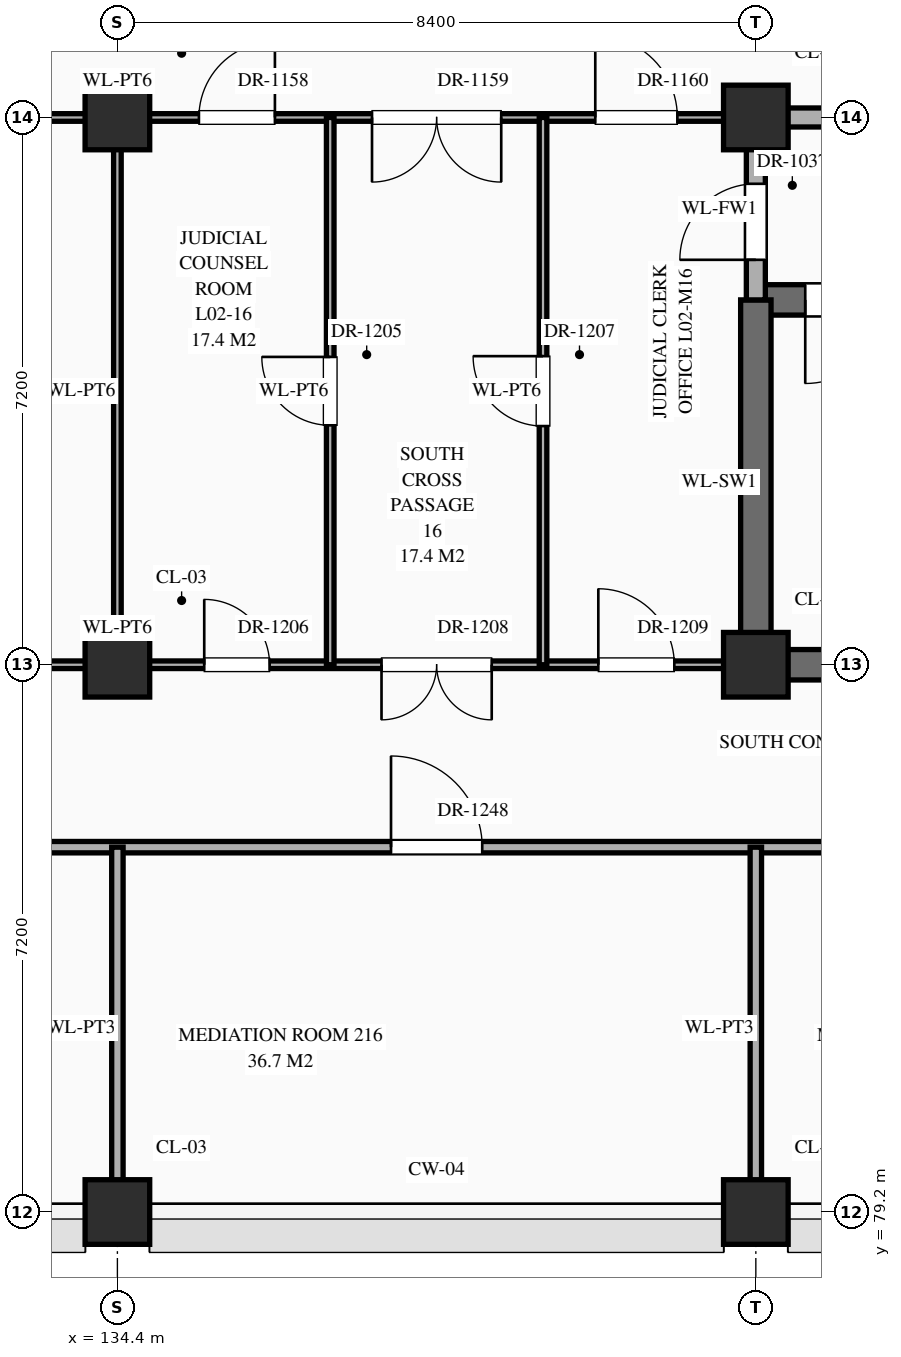
"""IFC4 building model, lengths in metres.
Left out: names, types, materials, properties, quantities, classifications, styles, units other than length and angle.
Written with IfcOpenShell. Run it as: python <this file> out.ifc"""

import sys

from ifc_helpers import new_model, si_unit, direction, frame, frame_2d, origin, origin_2d, place, context, subcontext, project, spatial, rectangle, extrude, element, fill, save


model = new_model("IFC4")
c1 = context("Model", 3, precision=1e-05, world=origin(), true_north=direction((0.0, 1.0)))
c2 = subcontext(c1, "Body", "Model", "MODEL_VIEW")
j1 = project(units=[si_unit("LENGTHUNIT", "METRE"), si_unit("PLANEANGLEUNIT", "RADIAN")], contexts=[c1])
p1 = place(None, origin())
s1 = spatial("IfcSite", under=j1, at=p1, CompositionType="ELEMENT")
p2 = place(p1, origin())
s2 = spatial("IfcBuilding", under=s1, at=p2, CompositionType="ELEMENT")
p3 = place(p2, frame((0.0, 0.0, 5.4)))
s3 = spatial("IfcBuildingStorey", under=s2, at=p3, CompositionType="ELEMENT", Elevation=5.4)
for number, where, z_axis, x_axis in (
    (1, (134.4, 79.2, 0.0), (0.0, 0.0, 1.0), (1.0, 0.0, 0.0)),
    (2, (134.4, 86.4, 0.0), (0.0, 0.0, 1.0), (1.0, 0.0, 0.0)),
    (3, (134.4, 93.6, 0.0), (0.0, 0.0, 1.0), (1.0, 0.0, 0.0)),
    (4, (142.8, 79.2, 0.0), (0.0, 0.0, 1.0), (1.0, 0.0, 0.0)),
    (5, (142.8, 86.4, 0.0), (0.0, 0.0, 1.0), (1.0, 0.0, 0.0)),
    (6, (142.8, 93.6, 0.0), (0.0, 0.0, 1.0), (1.0, 0.0, 0.0)),
):
    element("IfcColumn", number, at=place(p3, frame(where, z_axis=z_axis, x_axis=x_axis)), inside=s3, PredefinedType="COLUMN", context=c2, shape_type="SweptSolid", body=[
        extrude(rectangle(XDim=0.85, YDim=0.85, at=origin_2d()), origin(), (0.0, 0.0, 1.0), 5.4),
    ])
p4 = place(p3, frame((16.8, 84.0, 0.0), z_axis=(0.0, 0.0, 1.0), x_axis=(1.0, 0.0, 0.0)))
e7 = element("IfcWall", 7, at=p4, inside=s3, PredefinedType="STANDARD", context=c2, shape_type="SweptSolid", body=[
    extrude(rectangle(XDim=134.4, YDim=0.15, at=frame_2d((67.2, 0.0))), origin(), (0.0, 0.0, 1.0), 5.12),
])
p5 = place(p4, frame((3.58, 0.0, 0.0)))
e8 = element("IfcOpeningElement", 8, at=p5, cuts=e7, PredefinedType="OPENING", context=c2, shape_type="SweptSolid", body=[
    extrude(rectangle(XDim=1.24, YDim=2.3, at=frame_2d((0.62, 1.15))), frame((0.0, 0.087, 0.0), z_axis=(0.0, -1.0, 0.0), x_axis=(1.0, 0.0, 0.0)), (0.0, 0.0, 1.0), 0.174),
])
p6 = place(p4, frame((11.96, 0.0, 0.0)))
e9 = element("IfcOpeningElement", 9, at=p6, cuts=e7, PredefinedType="OPENING", context=c2, shape_type="SweptSolid", body=[
    extrude(rectangle(XDim=1.28, YDim=2.35, at=frame_2d((0.64, 1.175))), frame((0.0, 0.087, 0.0), z_axis=(0.0, -1.0, 0.0), x_axis=(1.0, 0.0, 0.0)), (0.0, 0.0, 1.0), 0.174),
])
p7 = place(p4, frame((20.53, 0.0, 0.0)))
e10 = element("IfcOpeningElement", 10, at=p7, cuts=e7, PredefinedType="OPENING", context=c2, shape_type="SweptSolid", body=[
    extrude(rectangle(XDim=0.94, YDim=2.3, at=frame_2d((0.47, 1.15))), frame((0.0, 0.087, 0.0), z_axis=(0.0, -1.0, 0.0), x_axis=(1.0, 0.0, 0.0)), (0.0, 0.0, 1.0), 0.174),
])
p8 = place(p4, frame((28.91, 0.0, 0.0)))
e11 = element("IfcOpeningElement", 11, at=p8, cuts=e7, PredefinedType="OPENING", context=c2, shape_type="SweptSolid", body=[
    extrude(rectangle(XDim=0.98, YDim=2.35, at=frame_2d((0.49, 1.175))), frame((0.0, 0.087, 0.0), z_axis=(0.0, -1.0, 0.0), x_axis=(1.0, 0.0, 0.0)), (0.0, 0.0, 1.0), 0.174),
])
p9 = place(p4, frame((37.27, 0.0, 0.0)))
e12 = element("IfcOpeningElement", 12, at=p9, cuts=e7, PredefinedType="OPENING", context=c2, shape_type="SweptSolid", body=[
    extrude(rectangle(XDim=1.06, YDim=2.4, at=frame_2d((0.53, 1.2))), frame((0.0, 0.087, 0.0), z_axis=(0.0, -1.0, 0.0), x_axis=(1.0, 0.0, 0.0)), (0.0, 0.0, 1.0), 0.174),
])
p10 = place(p4, frame((45.63, 0.0, 0.0)))
e13 = element("IfcOpeningElement", 13, at=p10, cuts=e7, PredefinedType="OPENING", context=c2, shape_type="SweptSolid", body=[
    extrude(rectangle(XDim=1.14, YDim=2.4, at=frame_2d((0.57, 1.2))), frame((0.0, 0.087, 0.0), z_axis=(0.0, -1.0, 0.0), x_axis=(1.0, 0.0, 0.0)), (0.0, 0.0, 1.0), 0.174),
])
p11 = place(p4, frame((54.15, 0.0, 0.0)))
e14 = element("IfcOpeningElement", 14, at=p11, cuts=e7, PredefinedType="OPENING", context=c2, shape_type="SweptSolid", body=[
    extrude(rectangle(XDim=0.9, YDim=2.15, at=frame_2d((0.45, 1.075))), frame((0.0, 0.087, 0.0), z_axis=(0.0, -1.0, 0.0), x_axis=(1.0, 0.0, 0.0)), (0.0, 0.0, 1.0), 0.174),
])
p12 = place(p4, frame((62.57, 0.0, 0.0)))
e15 = element("IfcOpeningElement", 15, at=p12, cuts=e7, PredefinedType="OPENING", context=c2, shape_type="SweptSolid", body=[
    extrude(rectangle(XDim=0.86, YDim=2.1, at=frame_2d((0.43, 1.05))), frame((0.0, 0.087, 0.0), z_axis=(0.0, -1.0, 0.0), x_axis=(1.0, 0.0, 0.0)), (0.0, 0.0, 1.0), 0.174),
])
p13 = place(p4, frame((70.92, 0.0, 0.0)))
e16 = element("IfcOpeningElement", 16, at=p13, cuts=e7, PredefinedType="OPENING", context=c2, shape_type="SweptSolid", body=[
    extrude(rectangle(XDim=0.96, YDim=2.2, at=frame_2d((0.48, 1.1))), frame((0.0, 0.087, 0.0), z_axis=(0.0, -1.0, 0.0), x_axis=(1.0, 0.0, 0.0)), (0.0, 0.0, 1.0), 0.174),
])
p14 = place(p4, frame((79.3, 0.0, 0.0)))
e17 = element("IfcOpeningElement", 17, at=p14, cuts=e7, PredefinedType="OPENING", context=c2, shape_type="SweptSolid", body=[
    extrude(rectangle(XDim=1.0, YDim=2.25, at=frame_2d((0.5, 1.125))), frame((0.0, 0.087, 0.0), z_axis=(0.0, -1.0, 0.0), x_axis=(1.0, 0.0, 0.0)), (0.0, 0.0, 1.0), 0.174),
])
p15 = place(p4, frame((87.68, 0.0, 0.0)))
e18 = element("IfcOpeningElement", 18, at=p15, cuts=e7, PredefinedType="OPENING", context=c2, shape_type="SweptSolid", body=[
    extrude(rectangle(XDim=1.04, YDim=2.2, at=frame_2d((0.52, 1.1))), frame((0.0, 0.087, 0.0), z_axis=(0.0, -1.0, 0.0), x_axis=(1.0, 0.0, 0.0)), (0.0, 0.0, 1.0), 0.174),
])
p16 = place(p4, frame((96.06, 0.0, 0.0)))
e19 = element("IfcOpeningElement", 19, at=p16, cuts=e7, PredefinedType="OPENING", context=c2, shape_type="SweptSolid", body=[
    extrude(rectangle(XDim=1.08, YDim=2.25, at=frame_2d((0.54, 1.125))), frame((0.0, 0.087, 0.0), z_axis=(0.0, -1.0, 0.0), x_axis=(1.0, 0.0, 0.0)), (0.0, 0.0, 1.0), 0.174),
])
p17 = place(p4, frame((104.44, 0.0, 0.0)))
e20 = element("IfcOpeningElement", 20, at=p17, cuts=e7, PredefinedType="OPENING", context=c2, shape_type="SweptSolid", body=[
    extrude(rectangle(XDim=1.12, YDim=2.25, at=frame_2d((0.56, 1.125))), frame((0.0, 0.087, 0.0), z_axis=(0.0, -1.0, 0.0), x_axis=(1.0, 0.0, 0.0)), (0.0, 0.0, 1.0), 0.174),
])
p18 = place(p4, frame((112.82, 0.0, 0.0)))
e21 = element("IfcOpeningElement", 21, at=p18, cuts=e7, PredefinedType="OPENING", context=c2, shape_type="SweptSolid", body=[
    extrude(rectangle(XDim=1.16, YDim=2.3, at=frame_2d((0.58, 1.15))), frame((0.0, 0.087, 0.0), z_axis=(0.0, -1.0, 0.0), x_axis=(1.0, 0.0, 0.0)), (0.0, 0.0, 1.0), 0.174),
])
p19 = place(p4, frame((121.2, 0.0, 0.0)))
e22 = element("IfcOpeningElement", 22, at=p19, cuts=e7, PredefinedType="OPENING", context=c2, shape_type="SweptSolid", body=[
    extrude(rectangle(XDim=1.2, YDim=2.35, at=frame_2d((0.6, 1.175))), frame((0.0, 0.087, 0.0), z_axis=(0.0, -1.0, 0.0), x_axis=(1.0, 0.0, 0.0)), (0.0, 0.0, 1.0), 0.174),
])
p20 = place(p4, frame((129.58, 0.0, 0.0)))
e23 = element("IfcOpeningElement", 23, at=p20, cuts=e7, PredefinedType="OPENING", context=c2, shape_type="SweptSolid", body=[
    extrude(rectangle(XDim=1.24, YDim=2.3, at=frame_2d((0.62, 1.15))), frame((0.0, 0.087, 0.0), z_axis=(0.0, -1.0, 0.0), x_axis=(1.0, 0.0, 0.0)), (0.0, 0.0, 1.0), 0.174),
])
p21 = place(p3, frame((126.0, 86.4, 0.0), z_axis=(0.0, 0.0, 1.0), x_axis=(1.0, 0.0, 0.0)))
e24 = element("IfcWall", 24, at=p21, inside=s3, PredefinedType="STANDARD", context=c2, shape_type="SweptSolid", body=[
    extrude(rectangle(XDim=16.8, YDim=0.1, at=frame_2d((8.4, 0.0))), origin(), (0.0, 0.0, 1.0), 4.27),
])
p22 = place(p21, frame((3.63, 0.0, 0.0)))
e25 = element("IfcOpeningElement", 25, at=p22, cuts=e24, PredefinedType="OPENING", context=c2, shape_type="SweptSolid", body=[
    extrude(rectangle(XDim=1.14, YDim=2.4, at=frame_2d((0.57, 1.2))), frame((0.0, 0.062, 0.0), z_axis=(0.0, -1.0, 0.0), x_axis=(1.0, 0.0, 0.0)), (0.0, 0.0, 1.0), 0.124),
])
p23 = place(p21, frame((9.542, 0.0, 0.0)))
e26 = element("IfcOpeningElement", 26, at=p23, cuts=e24, PredefinedType="OPENING", context=c2, shape_type="SweptSolid", body=[
    extrude(rectangle(XDim=0.86, YDim=2.1, at=frame_2d((0.43, 1.05))), frame((0.0, 0.062, 0.0), z_axis=(0.0, -1.0, 0.0), x_axis=(1.0, 0.0, 0.0)), (0.0, 0.0, 1.0), 0.124),
])
p24 = place(p21, frame((11.875, 0.0, 0.0)))
e27 = element("IfcOpeningElement", 27, at=p24, cuts=e24, PredefinedType="OPENING", context=c2, shape_type="SweptSolid", body=[
    extrude(rectangle(XDim=1.45, YDim=2.3, at=frame_2d((0.725, 1.15))), frame((0.0, 0.062, 0.0), z_axis=(0.0, -1.0, 0.0), x_axis=(1.0, 0.0, 0.0)), (0.0, 0.0, 1.0), 0.124),
])
p25 = place(p21, frame((14.728, 0.0, 0.0)))
e28 = element("IfcOpeningElement", 28, at=p25, cuts=e24, PredefinedType="OPENING", context=c2, shape_type="SweptSolid", body=[
    extrude(rectangle(XDim=1.0, YDim=2.25, at=frame_2d((0.5, 1.125))), frame((0.0, 0.062, 0.0), z_axis=(0.0, -1.0, 0.0), x_axis=(1.0, 0.0, 0.0)), (0.0, 0.0, 1.0), 0.124),
])
p26 = place(p3, frame((142.8, 86.4, 0.0), z_axis=(0.0, 0.0, 1.0), x_axis=(1.0, 0.0, 0.0)))
e29 = element("IfcWall", 29, at=p26, inside=s3, PredefinedType="SHEAR", context=c2, shape_type="SweptSolid", body=[
    extrude(rectangle(XDim=8.4, YDim=0.4, at=frame_2d((4.2, 0.0))), origin(), (0.0, 0.0, 1.0), 5.12),
])
p27 = place(p3, frame((142.8, 91.2, 0.0), z_axis=(0.0, 0.0, 1.0), x_axis=(1.0, 0.0, 0.0)))
e30 = element("IfcWall", 30, at=p27, inside=s3, PredefinedType="SHEAR", context=c2, shape_type="SweptSolid", body=[
    extrude(rectangle(XDim=8.4, YDim=0.4, at=frame_2d((4.2, 0.0))), origin(), (0.0, 0.0, 1.0), 5.12),
])
p28 = place(p27, frame((0.65, 0.0, 0.0)))
e31 = element("IfcOpeningElement", 31, at=p28, cuts=e30, PredefinedType="OPENING", context=c2, shape_type="SweptSolid", body=[
    extrude(rectangle(XDim=1.1, YDim=2.2, at=frame_2d((0.55, 1.1))), frame((0.0, 0.212, 0.0), z_axis=(0.0, -1.0, 0.0), x_axis=(1.0, 0.0, 0.0)), (0.0, 0.0, 1.0), 0.424),
])
p29 = place(p3, frame((126.0, 93.6, 0.0), z_axis=(0.0, 0.0, 1.0), x_axis=(1.0, 0.0, 0.0)))
e32 = element("IfcWall", 32, at=p29, inside=s3, PredefinedType="STANDARD", context=c2, shape_type="SweptSolid", body=[
    extrude(rectangle(XDim=16.8, YDim=0.1, at=frame_2d((8.4, 0.0))), origin(), (0.0, 0.0, 1.0), 4.27),
])
p30 = place(p29, frame((3.72, 0.0, 0.0)))
e33 = element("IfcOpeningElement", 33, at=p30, cuts=e32, PredefinedType="OPENING", context=c2, shape_type="SweptSolid", body=[
    extrude(rectangle(XDim=0.96, YDim=2.2, at=frame_2d((0.48, 1.1))), frame((0.0, 0.062, 0.0), z_axis=(0.0, -1.0, 0.0), x_axis=(1.0, 0.0, 0.0)), (0.0, 0.0, 1.0), 0.124),
])
p31 = place(p29, frame((9.472, 0.0, 0.0)))
e34 = element("IfcOpeningElement", 34, at=p31, cuts=e32, PredefinedType="OPENING", context=c2, shape_type="SweptSolid", body=[
    extrude(rectangle(XDim=1.0, YDim=2.25, at=frame_2d((0.5, 1.125))), frame((0.0, 0.062, 0.0), z_axis=(0.0, -1.0, 0.0), x_axis=(1.0, 0.0, 0.0)), (0.0, 0.0, 1.0), 0.124),
])
p32 = place(p29, frame((11.75, 0.0, 0.0)))
e35 = element("IfcOpeningElement", 35, at=p32, cuts=e32, PredefinedType="OPENING", context=c2, shape_type="SweptSolid", body=[
    extrude(rectangle(XDim=1.7, YDim=2.45, at=frame_2d((0.85, 1.225))), frame((0.0, 0.062, 0.0), z_axis=(0.0, -1.0, 0.0), x_axis=(1.0, 0.0, 0.0)), (0.0, 0.0, 1.0), 0.124),
])
p33 = place(p29, frame((14.688, 0.0, 0.0)))
e36 = element("IfcOpeningElement", 36, at=p33, cuts=e32, PredefinedType="OPENING", context=c2, shape_type="SweptSolid", body=[
    extrude(rectangle(XDim=1.08, YDim=2.25, at=frame_2d((0.54, 1.125))), frame((0.0, 0.062, 0.0), z_axis=(0.0, -1.0, 0.0), x_axis=(1.0, 0.0, 0.0)), (0.0, 0.0, 1.0), 0.124),
])
p34 = place(p3, frame((142.8, 93.6, 0.0), z_axis=(0.0, 0.0, 1.0), x_axis=(1.0, 0.0, 0.0)))
e37 = element("IfcWall", 37, at=p34, inside=s3, PredefinedType="STANDARD", context=c2, shape_type="SweptSolid", body=[
    extrude(rectangle(XDim=8.4, YDim=0.25, at=frame_2d((4.2, 0.0))), origin(), (0.0, 0.0, 1.0), 4.27),
])
p35 = place(p34, frame((3.45, 0.0, 0.0)))
e38 = element("IfcOpeningElement", 38, at=p35, cuts=e37, PredefinedType="OPENING", context=c2, shape_type="SweptSolid", body=[
    extrude(rectangle(XDim=1.5, YDim=2.25, at=frame_2d((0.75, 1.125))), frame((0.0, 0.137, 0.0), z_axis=(0.0, -1.0, 0.0), x_axis=(1.0, 0.0, 0.0)), (0.0, 0.0, 1.0), 0.274),
])
p36 = place(p3, frame((134.4, 79.24, 0.0), z_axis=(0.0, 0.0, 1.0), x_axis=(0.0, 1.0, 0.0)))
e39 = element("IfcWall", 39, at=p36, inside=s3, PredefinedType="STANDARD", context=c2, shape_type="SweptSolid", body=[
    extrude(rectangle(XDim=4.76, YDim=0.15, at=frame_2d((2.38, 0.0))), origin(), (0.0, 0.0, 1.0), 4.37),
])
p37 = place(p3, frame((134.4, 86.4, 0.0), z_axis=(0.0, 0.0, 1.0), x_axis=(0.0, 1.0, 0.0)))
e40 = element("IfcWall", 40, at=p37, inside=s3, PredefinedType="STANDARD", context=c2, shape_type="SweptSolid", body=[
    extrude(rectangle(XDim=7.2, YDim=0.1, at=frame_2d((3.6, 0.0))), origin(), (0.0, 0.0, 1.0), 4.37),
])
p38 = place(p3, frame((137.2, 86.4, 0.0), z_axis=(0.0, 0.0, 1.0), x_axis=(0.0, 1.0, 0.0)))
e41 = element("IfcWall", 41, at=p38, inside=s3, PredefinedType="STANDARD", context=c2, shape_type="SweptSolid", body=[
    extrude(rectangle(XDim=7.2, YDim=0.1, at=frame_2d((3.6, 0.0))), origin(), (0.0, 0.0, 1.0), 5.12),
])
p39 = place(p38, frame((3.15, 0.0, 0.0)))
e42 = element("IfcOpeningElement", 42, at=p39, cuts=e41, PredefinedType="OPENING", context=c2, shape_type="SweptSolid", body=[
    extrude(rectangle(XDim=0.9, YDim=2.15, at=frame_2d((0.45, 1.075))), frame((0.0, 0.062, 0.0), z_axis=(0.0, -1.0, 0.0), x_axis=(1.0, 0.0, 0.0)), (0.0, 0.0, 1.0), 0.124),
])
p40 = place(p3, frame((140.0, 86.4, 0.0), z_axis=(0.0, 0.0, 1.0), x_axis=(0.0, 1.0, 0.0)))
e43 = element("IfcWall", 43, at=p40, inside=s3, PredefinedType="STANDARD", context=c2, shape_type="SweptSolid", body=[
    extrude(rectangle(XDim=7.2, YDim=0.1, at=frame_2d((3.6, 0.0))), origin(), (0.0, 0.0, 1.0), 5.12),
])
p41 = place(p40, frame((3.14, 0.0, 0.0)))
e44 = element("IfcOpeningElement", 44, at=p41, cuts=e43, PredefinedType="OPENING", context=c2, shape_type="SweptSolid", body=[
    extrude(rectangle(XDim=0.92, YDim=2.15, at=frame_2d((0.46, 1.075))), frame((0.0, 0.062, 0.0), z_axis=(0.0, -1.0, 0.0), x_axis=(1.0, 0.0, 0.0)), (0.0, 0.0, 1.0), 0.124),
])
p42 = place(p3, frame((142.8, 79.24, 0.0), z_axis=(0.0, 0.0, 1.0), x_axis=(0.0, 1.0, 0.0)))
e45 = element("IfcWall", 45, at=p42, inside=s3, PredefinedType="STANDARD", context=c2, shape_type="SweptSolid", body=[
    extrude(rectangle(XDim=4.76, YDim=0.15, at=frame_2d((2.38, 0.0))), origin(), (0.0, 0.0, 1.0), 4.37),
])
p43 = place(p3, frame((142.8, 86.4, 0.0), z_axis=(0.0, 0.0, 1.0), x_axis=(0.0, 1.0, 0.0)))
e46 = element("IfcWall", 46, at=p43, inside=s3, PredefinedType="SHEAR", context=c2, shape_type="SweptSolid", body=[
    extrude(rectangle(XDim=4.8, YDim=0.4, at=frame_2d((2.4, 0.0))), origin(), (0.0, 0.0, 1.0), 5.12),
])
p44 = place(p3, frame((142.8, 91.2, 0.0), z_axis=(0.0, 0.0, 1.0), x_axis=(0.0, 1.0, 0.0)))
e47 = element("IfcWall", 47, at=p44, inside=s3, PredefinedType="STANDARD", context=c2, shape_type="SweptSolid", body=[
    extrude(rectangle(XDim=2.4, YDim=0.25, at=frame_2d((1.2, 0.0))), origin(), (0.0, 0.0, 1.0), 4.37),
])
p45 = place(p44, frame((0.528, 0.0, 0.0)))
e48 = element("IfcOpeningElement", 48, at=p45, cuts=e47, PredefinedType="OPENING", context=c2, shape_type="SweptSolid", body=[
    extrude(rectangle(XDim=1.0, YDim=2.2, at=frame_2d((0.5, 1.1))), frame((0.0, 0.137, 0.0), z_axis=(0.0, -1.0, 0.0), x_axis=(1.0, 0.0, 0.0)), (0.0, 0.0, 1.0), 0.274),
])
p46 = place(p28, frame((1.1, 0.0, 0.0), z_axis=(0.0, 0.0, 1.0), x_axis=(-1.0, 0.0, 0.0)))
e49 = element("IfcDoor", 49, at=p46, inside=s3, OperationType="SINGLE_SWING_RIGHT", PredefinedType="DOOR", context=c2, shape_type="SweptSolid", body=[
    extrude(rectangle(XDim=1.1, YDim=2.2, at=frame_2d((0.55, 1.1))), frame((0.0, 0.025, 0.0), z_axis=(0.0, -1.0, 0.0), x_axis=(1.0, 0.0, 0.0)), (0.0, 0.0, 1.0), 0.05),
])
fill(e31, e49)
p47 = place(p45, origin())
e50 = element("IfcDoor", 50, at=p47, inside=s3, OperationType="SINGLE_SWING_LEFT", PredefinedType="DOOR", context=c2, shape_type="SweptSolid", body=[
    extrude(rectangle(XDim=1.0, YDim=2.2, at=frame_2d((0.5, 1.1))), frame((0.0, 0.025, 0.0), z_axis=(0.0, -1.0, 0.0), x_axis=(1.0, 0.0, 0.0)), (0.0, 0.0, 1.0), 0.05),
])
fill(e48, e50)
p48 = place(p31, origin())
e51 = element("IfcDoor", 51, at=p48, inside=s3, OperationType="SINGLE_SWING_RIGHT", PredefinedType="DOOR", context=c2, shape_type="SweptSolid", body=[
    extrude(rectangle(XDim=1.0, YDim=2.25, at=frame_2d((0.5, 1.125))), frame((0.0, 0.025, 0.0), z_axis=(0.0, -1.0, 0.0), x_axis=(1.0, 0.0, 0.0)), (0.0, 0.0, 1.0), 0.05),
])
fill(e34, e51)
p49 = place(p32, frame((1.7, 0.0, 0.0), z_axis=(0.0, 0.0, 1.0), x_axis=(-1.0, 0.0, 0.0)))
e52 = element("IfcDoor", 52, at=p49, inside=s3, OperationType="DOUBLE_DOOR_SINGLE_SWING", PredefinedType="DOOR", context=c2, shape_type="SweptSolid", body=[
    extrude(rectangle(XDim=1.7, YDim=2.45, at=frame_2d((0.85, 1.225))), frame((0.0, 0.025, 0.0), z_axis=(0.0, -1.0, 0.0), x_axis=(1.0, 0.0, 0.0)), (0.0, 0.0, 1.0), 0.05),
])
fill(e35, e52)
p50 = place(p33, origin())
e53 = element("IfcDoor", 53, at=p50, inside=s3, OperationType="SINGLE_SWING_LEFT", PredefinedType="DOOR", context=c2, shape_type="SweptSolid", body=[
    extrude(rectangle(XDim=1.08, YDim=2.25, at=frame_2d((0.54, 1.125))), frame((0.0, 0.025, 0.0), z_axis=(0.0, -1.0, 0.0), x_axis=(1.0, 0.0, 0.0)), (0.0, 0.0, 1.0), 0.05),
])
fill(e36, e53)
p51 = place(p39, origin())
e54 = element("IfcDoor", 54, at=p51, inside=s3, OperationType="SINGLE_SWING_RIGHT", PredefinedType="DOOR", context=c2, shape_type="SweptSolid", body=[
    extrude(rectangle(XDim=0.9, YDim=2.15, at=frame_2d((0.45, 1.075))), frame((0.0, 0.025, 0.0), z_axis=(0.0, -1.0, 0.0), x_axis=(1.0, 0.0, 0.0)), (0.0, 0.0, 1.0), 0.05),
])
fill(e42, e54)
p52 = place(p23, origin())
e55 = element("IfcDoor", 55, at=p52, inside=s3, OperationType="SINGLE_SWING_LEFT", PredefinedType="DOOR", context=c2, shape_type="SweptSolid", body=[
    extrude(rectangle(XDim=0.86, YDim=2.1, at=frame_2d((0.43, 1.05))), frame((0.0, 0.025, 0.0), z_axis=(0.0, -1.0, 0.0), x_axis=(1.0, 0.0, 0.0)), (0.0, 0.0, 1.0), 0.05),
])
fill(e26, e55)
p53 = place(p41, origin())
e56 = element("IfcDoor", 56, at=p53, inside=s3, OperationType="SINGLE_SWING_RIGHT", PredefinedType="DOOR", context=c2, shape_type="SweptSolid", body=[
    extrude(rectangle(XDim=0.92, YDim=2.15, at=frame_2d((0.46, 1.075))), frame((0.0, 0.025, 0.0), z_axis=(0.0, -1.0, 0.0), x_axis=(1.0, 0.0, 0.0)), (0.0, 0.0, 1.0), 0.05),
])
fill(e44, e56)
p54 = place(p24, frame((1.45, 0.0, 0.0), z_axis=(0.0, 0.0, 1.0), x_axis=(-1.0, 0.0, 0.0)))
e57 = element("IfcDoor", 57, at=p54, inside=s3, OperationType="DOUBLE_DOOR_SINGLE_SWING", PredefinedType="DOOR", context=c2, shape_type="SweptSolid", body=[
    extrude(rectangle(XDim=1.45, YDim=2.3, at=frame_2d((0.725, 1.15))), frame((0.0, 0.025, 0.0), z_axis=(0.0, -1.0, 0.0), x_axis=(1.0, 0.0, 0.0)), (0.0, 0.0, 1.0), 0.05),
])
fill(e27, e57)
p55 = place(p25, origin())
e58 = element("IfcDoor", 58, at=p55, inside=s3, OperationType="SINGLE_SWING_LEFT", PredefinedType="DOOR", context=c2, shape_type="SweptSolid", body=[
    extrude(rectangle(XDim=1.0, YDim=2.25, at=frame_2d((0.5, 1.125))), frame((0.0, 0.025, 0.0), z_axis=(0.0, -1.0, 0.0), x_axis=(1.0, 0.0, 0.0)), (0.0, 0.0, 1.0), 0.05),
])
fill(e28, e58)
p56 = place(p19, origin())
e59 = element("IfcDoor", 59, at=p56, inside=s3, OperationType="SINGLE_SWING_LEFT", PredefinedType="DOOR", context=c2, shape_type="SweptSolid", body=[
    extrude(rectangle(XDim=1.2, YDim=2.35, at=frame_2d((0.6, 1.175))), frame((0.0, 0.025, 0.0), z_axis=(0.0, -1.0, 0.0), x_axis=(1.0, 0.0, 0.0)), (0.0, 0.0, 1.0), 0.05),
])
fill(e22, e59)
save(model, sys.argv[1])
